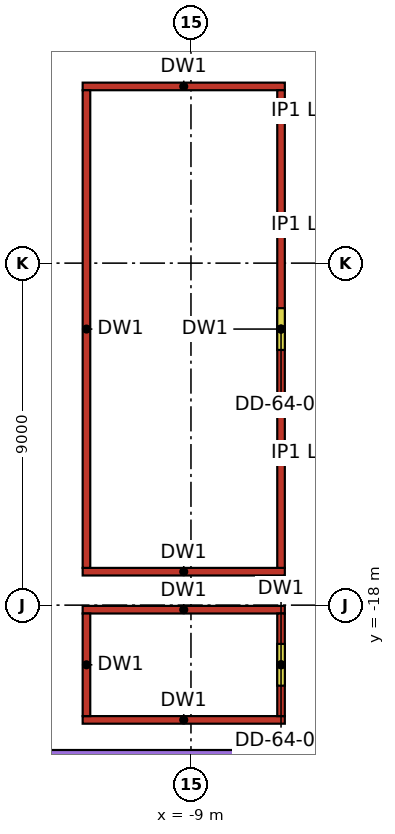
"""IFC4 building model, lengths in metres.
Left out: names, types, materials, properties, quantities, classifications, styles, units other than length and angle.
Written with IfcOpenShell. Run it as: python <this file> out.ifc"""

import sys

from ifc_helpers import new_model, si_unit, direction, frame, frame_2d, origin, place, context, subcontext, project, spatial, rectangle, extrude, element, fill, save


model = new_model("IFC4")
c1 = context("Model", 3, precision=1e-05, world=origin(), true_north=direction((0.0, 1.0)))
c2 = subcontext(c1, "Body", "Model", "MODEL_VIEW")
j1 = project(units=[si_unit("LENGTHUNIT", "METRE"), si_unit("PLANEANGLEUNIT", "RADIAN")], contexts=[c1])
p1 = place(None, origin())
s1 = spatial("IfcSite", under=j1, at=p1, CompositionType="ELEMENT")
p2 = place(p1, origin())
s2 = spatial("IfcBuilding", under=s1, at=p2, CompositionType="ELEMENT")
p3 = place(p2, frame((0.0, 0.0, 266.0)))
s3 = spatial("IfcBuildingStorey", under=s2, at=p3, CompositionType="ELEMENT", Elevation=266.0)
p4 = place(p3, frame((-12.409, 10.107, 0.0), z_axis=(0.0, 0.0, 1.0), x_axis=(-0.1391723, -0.9902682, 0.0)))
e1 = element("IfcWall", 1, at=p4, inside=s3, PredefinedType="STANDARD", context=c2, shape_type="SweptSolid", body=[
    extrude(rectangle(XDim=28.876, YDim=0.3, at=frame_2d((14.438, 0.0))), origin(), (0.0, 0.0, 1.0), 2.5),
])
p5 = place(p4, frame((10.75, 0.0, 0.0)))
e2 = element("IfcOpeningElement", 2, at=p5, cuts=e1, PredefinedType="OPENING", context=c2, shape_type="SweptSolid", body=[
    extrude(rectangle(XDim=1.8, YDim=2.4, at=frame_2d((0.9, 1.2))), frame((0.0, 0.15, 0.0), z_axis=(0.0, -1.0, 0.0), x_axis=(1.0, 0.0, 0.0)), (0.0, 0.0, 1.0), 0.3),
])
for number, where, z_axis, x_axis in (
    (3, (-11.85, -21.02, 0.0), (0.0, 0.0, 1.0), (1.0, 0.0, 0.0)),
    (4, (-11.85, -18.12, 0.0), (0.0, 0.0, 1.0), (1.0, 0.0, 0.0)),
):
    element("IfcWall", number, at=place(p3, frame(where, z_axis=z_axis, x_axis=x_axis)), inside=s3, PredefinedType="PARTITIONING", context=c2, shape_type="SweptSolid", body=[
        extrude(rectangle(XDim=5.32, YDim=0.2, at=frame_2d((2.66, 0.0))), origin(), (0.0, 0.0, 1.0), 3.3),
    ])
p6 = place(p3, frame((-11.75, -20.92, 0.0), z_axis=(0.0, 0.0, 1.0), x_axis=(0.0, 1.0, 0.0)))
e5 = element("IfcWall", 5, at=p6, inside=s3, PredefinedType="PARTITIONING", context=c2, shape_type="SweptSolid", body=[
    extrude(rectangle(XDim=2.7, YDim=0.2, at=frame_2d((1.35, 0.0))), origin(), (0.0, 0.0, 1.0), 3.3),
])
p7 = place(p3, frame((-6.63, -20.92, 0.0), z_axis=(0.0, 0.0, 1.0), x_axis=(0.0, 1.0, 0.0)))
e6 = element("IfcWall", 6, at=p7, inside=s3, PredefinedType="PARTITIONING", context=c2, shape_type="SweptSolid", body=[
    extrude(rectangle(XDim=2.7, YDim=0.2, at=frame_2d((1.35, 0.0))), origin(), (0.0, 0.0, 1.0), 3.3),
])
p8 = place(p7, frame((0.8, 0.0, 0.0)))
e7 = element("IfcOpeningElement", 7, at=p8, cuts=e6, PredefinedType="OPENING", context=c2, shape_type="SweptSolid", body=[
    extrude(rectangle(XDim=1.1, YDim=2.1, at=frame_2d((0.55, 1.05))), frame((0.0, 0.1, 0.0), z_axis=(0.0, -1.0, 0.0), x_axis=(1.0, 0.0, 0.0)), (0.0, 0.0, 1.0), 0.2),
])
for number, where, z_axis, x_axis in (
    (8, (-11.85, -17.12, 0.0), (0.0, 0.0, 1.0), (1.0, 0.0, 0.0)),
    (9, (-11.85, -4.35, 0.0), (0.0, 0.0, 1.0), (1.0, 0.0, 0.0)),
):
    element("IfcWall", number, at=place(p3, frame(where, z_axis=z_axis, x_axis=x_axis)), inside=s3, PredefinedType="PARTITIONING", context=c2, shape_type="SweptSolid", body=[
        extrude(rectangle(XDim=5.32, YDim=0.2, at=frame_2d((2.66, 0.0))), origin(), (0.0, 0.0, 1.0), 3.3),
    ])
p9 = place(p3, frame((-11.75, -17.02, 0.0), z_axis=(0.0, 0.0, 1.0), x_axis=(0.0, 1.0, 0.0)))
e10 = element("IfcWall", 10, at=p9, inside=s3, PredefinedType="PARTITIONING", context=c2, shape_type="SweptSolid", body=[
    extrude(rectangle(XDim=12.57, YDim=0.2, at=frame_2d((6.285, 0.0))), origin(), (0.0, 0.0, 1.0), 3.3),
])
p10 = place(p3, frame((-6.63, -17.02, 0.0), z_axis=(0.0, 0.0, 1.0), x_axis=(0.0, 1.0, 0.0)))
e11 = element("IfcWall", 11, at=p10, inside=s3, PredefinedType="PARTITIONING", context=c2, shape_type="SweptSolid", body=[
    extrude(rectangle(XDim=12.57, YDim=0.2, at=frame_2d((6.285, 0.0))), origin(), (0.0, 0.0, 1.0), 3.3),
])
p11 = place(p10, frame((5.735, 0.0, 0.0)))
e12 = element("IfcOpeningElement", 12, at=p11, cuts=e11, PredefinedType="OPENING", context=c2, shape_type="SweptSolid", body=[
    extrude(rectangle(XDim=1.1, YDim=2.1, at=frame_2d((0.55, 1.05))), frame((0.0, 0.1, 0.0), z_axis=(0.0, -1.0, 0.0), x_axis=(1.0, 0.0, 0.0)), (0.0, 0.0, 1.0), 0.2),
])
p12 = place(p8, origin())
e13 = element("IfcDoor", 13, at=p12, inside=s3, OperationType="SINGLE_SWING_LEFT", PredefinedType="DOOR", context=c2, shape_type="SweptSolid", body=[
    extrude(rectangle(XDim=1.1, YDim=2.1, at=frame_2d((0.55, 1.05))), frame((0.0, 0.025, 0.0), z_axis=(0.0, -1.0, 0.0), x_axis=(1.0, 0.0, 0.0)), (0.0, 0.0, 1.0), 0.05),
])
fill(e7, e13)
p13 = place(p11, origin())
e14 = element("IfcDoor", 14, at=p13, inside=s3, OperationType="SINGLE_SWING_LEFT", PredefinedType="DOOR", context=c2, shape_type="SweptSolid", body=[
    extrude(rectangle(XDim=1.1, YDim=2.1, at=frame_2d((0.55, 1.05))), frame((0.0, 0.025, 0.0), z_axis=(0.0, -1.0, 0.0), x_axis=(1.0, 0.0, 0.0)), (0.0, 0.0, 1.0), 0.05),
])
fill(e12, e14)
save(model, sys.argv[1])
